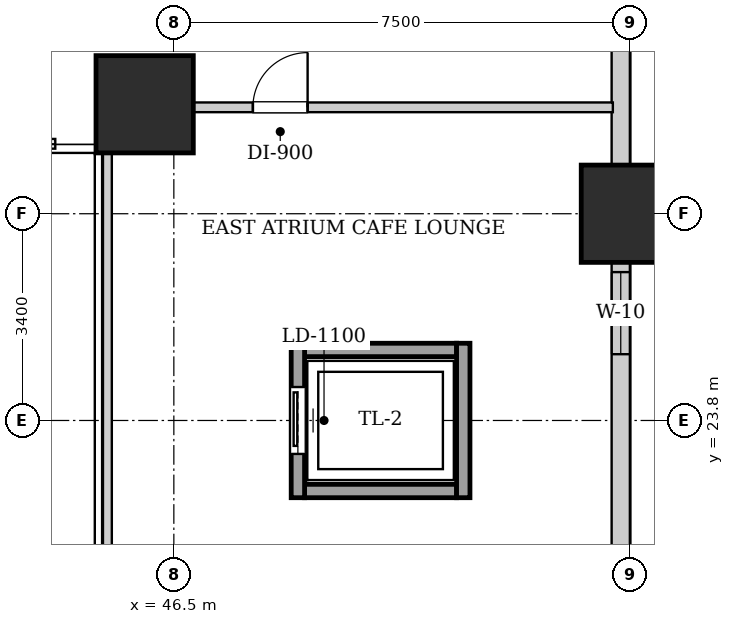
"""IFC4 building model, lengths in metres.
Left out: names, types, materials, properties, quantities, classifications, styles, units other than length and angle.
Written with IfcOpenShell. Run it as: python <this file> out.ifc"""

import sys

from ifc_helpers import new_model, si_unit, direction, frame, frame_2d, origin, origin_2d, place, context, subcontext, project, spatial, rectangle, extrude, element, fill, save


model = new_model("IFC4")
c1 = context("Model", 3, precision=1e-05, world=origin(), true_north=direction((0.0, 1.0)))
c2 = subcontext(c1, "Body", "Model", "MODEL_VIEW")
j1 = project(units=[si_unit("LENGTHUNIT", "METRE"), si_unit("PLANEANGLEUNIT", "RADIAN")], contexts=[c1])
p1 = place(None, origin())
s1 = spatial("IfcSite", under=j1, at=p1, CompositionType="ELEMENT")
p2 = place(p1, origin())
s2 = spatial("IfcBuilding", under=s1, at=p2, CompositionType="ELEMENT")
p3 = place(p2, frame((0.0, 0.0, 6.0)))
s3 = spatial("IfcBuildingStorey", under=s2, at=p3, CompositionType="ELEMENT", Elevation=6.0)
for number, where, z_axis, x_axis in (
    (1, (54.0, 27.2, 0.0), (0.0, 0.0, 1.0), (1.0, 0.0, 0.0)),
    (2, (46.02, 29.0, 0.0), (0.0, 0.0, 1.0), (1.0, 0.0, 0.0)),
):
    element("IfcColumn", number, at=place(p3, frame(where, z_axis=z_axis, x_axis=x_axis)), inside=s3, PredefinedType="COLUMN", context=c2, shape_type="SweptSolid", body=[
        extrude(rectangle(XDim=1.6, YDim=1.6, at=origin_2d()), origin(), (0.0, 0.0, 1.0), 5.2),
    ])
p4 = place(p3, frame((53.85, 47.44, 0.0), z_axis=(0.0, 0.0, 1.0), x_axis=(0.0, -1.0, 0.0)))
e3 = element("IfcWall", 3, at=p4, inside=s3, PredefinedType="SOLIDWALL", context=c2, shape_type="SweptSolid", body=[
    extrude(rectangle(XDim=47.28, YDim=0.3, at=frame_2d((23.64, 0.0))), origin(), (0.0, 0.0, 1.0), 3.765),
])
p5 = place(p4, frame((3.33, 0.0, 0.9)))
e4 = element("IfcOpeningElement", 4, at=p5, cuts=e3, PredefinedType="OPENING", context=c2, shape_type="SweptSolid", body=[
    extrude(rectangle(XDim=2.7, YDim=2.1, at=frame_2d((1.35, 1.05))), frame((0.0, 0.16, 0.0), z_axis=(0.0, -1.0, 0.0), x_axis=(1.0, 0.0, 0.0)), (0.0, 0.0, 1.0), 0.32),
])
p6 = place(p4, frame((9.78, 0.0, 0.9)))
e5 = element("IfcOpeningElement", 5, at=p6, cuts=e3, PredefinedType="OPENING", context=c2, shape_type="SweptSolid", body=[
    extrude(rectangle(XDim=2.7, YDim=2.1, at=frame_2d((1.35, 1.05))), frame((0.0, 0.16, 0.0), z_axis=(0.0, -1.0, 0.0), x_axis=(1.0, 0.0, 0.0)), (0.0, 0.0, 1.0), 0.32),
])
p7 = place(p4, frame((21.2, 0.0, 0.55)))
e6 = element("IfcOpeningElement", 6, at=p7, cuts=e3, PredefinedType="OPENING", context=c2, shape_type="SweptSolid", body=[
    extrude(rectangle(XDim=1.35, YDim=1.2, at=frame_2d((0.675, 0.6))), frame((0.0, 0.16, 0.0), z_axis=(0.0, -1.0, 0.0), x_axis=(1.0, 0.0, 0.0)), (0.0, 0.0, 1.0), 0.32),
])
p8 = place(p4, frame((36.5, 0.0, 0.9)))
e7 = element("IfcOpeningElement", 7, at=p8, cuts=e3, PredefinedType="OPENING", context=c2, shape_type="SweptSolid", body=[
    extrude(rectangle(XDim=2.7, YDim=2.1, at=frame_2d((1.35, 1.05))), frame((0.0, 0.16, 0.0), z_axis=(0.0, -1.0, 0.0), x_axis=(1.0, 0.0, 0.0)), (0.0, 0.0, 1.0), 0.32),
])
p9 = place(p4, frame((43.0, 0.0, 0.9)))
e8 = element("IfcOpeningElement", 8, at=p9, cuts=e3, PredefinedType="OPENING", context=c2, shape_type="SweptSolid", body=[
    extrude(rectangle(XDim=2.7, YDim=2.1, at=frame_2d((1.35, 1.05))), frame((0.0, 0.16, 0.0), z_axis=(0.0, -1.0, 0.0), x_axis=(1.0, 0.0, 0.0)), (0.0, 0.0, 1.0), 0.32),
])
for number, where, z_axis, x_axis in (
    (9, (48.65, 22.64, 0.0), (0.0, 0.0, 1.0), (1.0, 0.0, 0.0)),
    (10, (48.65, 24.96, 0.0), (0.0, 0.0, 1.0), (1.0, 0.0, 0.0)),
):
    element("IfcWall", number, at=place(p3, frame(where, z_axis=z_axis, x_axis=x_axis)), inside=s3, PredefinedType="SHEAR", context=c2, shape_type="SweptSolid", body=[
        extrude(rectangle(XDim=2.5, YDim=0.22, at=frame_2d((1.25, 0.0))), origin(), (0.0, 0.0, 1.0), 4.88),
    ])
p10 = place(p3, frame((48.54, 22.53, 0.0), z_axis=(0.0, 0.0, 1.0), x_axis=(0.0, 1.0, 0.0)))
e11 = element("IfcWall", 11, at=p10, inside=s3, PredefinedType="SHEAR", context=c2, shape_type="SweptSolid", body=[
    extrude(rectangle(XDim=2.54, YDim=0.22, at=frame_2d((1.27, 0.0))), origin(), (0.0, 0.0, 1.0), 4.88),
])
p11 = place(p10, frame((0.72, 0.0, 0.0)))
e12 = element("IfcOpeningElement", 12, at=p11, cuts=e11, PredefinedType="OPENING", context=c2, shape_type="SweptSolid", body=[
    extrude(rectangle(XDim=1.1, YDim=2.15, at=frame_2d((0.55, 1.075))), frame((0.0, 0.12, 0.0), z_axis=(0.0, -1.0, 0.0), x_axis=(1.0, 0.0, 0.0)), (0.0, 0.0, 1.0), 0.24),
])
p12 = place(p3, frame((51.26, 22.53, 0.0), z_axis=(0.0, 0.0, 1.0), x_axis=(0.0, 1.0, 0.0)))
e13 = element("IfcWall", 13, at=p12, inside=s3, PredefinedType="SHEAR", context=c2, shape_type="SweptSolid", body=[
    extrude(rectangle(XDim=2.54, YDim=0.22, at=frame_2d((1.27, 0.0))), origin(), (0.0, 0.0, 1.0), 4.88),
])
p13 = place(p3, frame((45.4, 28.95, 0.0), z_axis=(0.0, 0.0, 1.0), x_axis=(1.0, 0.0, 0.0)))
e14 = element("IfcWall", 14, at=p13, inside=s3, PredefinedType="PARTITIONING", context=c2, shape_type="SweptSolid", body=[
    extrude(rectangle(XDim=8.32, YDim=0.16, at=frame_2d((4.16, 0.0))), origin(), (0.0, 0.0, 1.0), 3.765),
])
p14 = place(p13, frame((2.4, 0.0, 0.0)))
e15 = element("IfcOpeningElement", 15, at=p14, cuts=e14, PredefinedType="OPENING", context=c2, shape_type="SweptSolid", body=[
    extrude(rectangle(XDim=0.9, YDim=2.05, at=frame_2d((0.45, 1.025))), frame((0.0, 0.09, 0.0), z_axis=(0.0, -1.0, 0.0), x_axis=(1.0, 0.0, 0.0)), (0.0, 0.0, 1.0), 0.18),
])
p15 = place(p3, frame((45.4, 15.1, 0.0), z_axis=(0.0, 0.0, 1.0), x_axis=(0.0, 1.0, 0.0)))
e16 = element("IfcWall", 16, at=p15, inside=s3, PredefinedType="PARTITIONING", context=c2, shape_type="SweptSolid", body=[
    extrude(rectangle(XDim=13.78, YDim=0.16, at=frame_2d((6.89, 0.0))), origin(), (0.0, 0.0, 1.0), 4.88),
])
p16 = place(p11, origin())
e17 = element("IfcDoor", 17, at=p16, inside=s3, OperationType="SLIDING_TO_LEFT", PredefinedType="DOOR", context=c2, shape_type="SweptSolid", body=[
    extrude(rectangle(XDim=1.1, YDim=2.15, at=frame_2d((0.55, 1.075))), frame((0.0, 0.025, 0.0), z_axis=(0.0, -1.0, 0.0), x_axis=(1.0, 0.0, 0.0)), (0.0, 0.0, 1.0), 0.05),
])
fill(e12, e17)
p17 = place(p14, origin())
e18 = element("IfcDoor", 18, at=p17, inside=s3, OperationType="SINGLE_SWING_RIGHT", PredefinedType="DOOR", context=c2, shape_type="SweptSolid", body=[
    extrude(rectangle(XDim=0.9, YDim=2.05, at=frame_2d((0.45, 1.025))), frame((0.0, 0.025, 0.0), z_axis=(0.0, -1.0, 0.0), x_axis=(1.0, 0.0, 0.0)), (0.0, 0.0, 1.0), 0.05),
])
fill(e15, e18)
p18 = place(p7, origin())
e19 = element("IfcWindow", 19, at=p18, inside=s3, PartitioningType="SINGLE_PANEL", PredefinedType="WINDOW", context=c2, shape_type="SweptSolid", body=[
    extrude(rectangle(XDim=1.35, YDim=1.2, at=frame_2d((0.675, 0.6))), frame((0.0, 0.03, 0.0), z_axis=(0.0, -1.0, 0.0), x_axis=(1.0, 0.0, 0.0)), (0.0, 0.0, 1.0), 0.06),
])
fill(e6, e19)
save(model, sys.argv[1])
